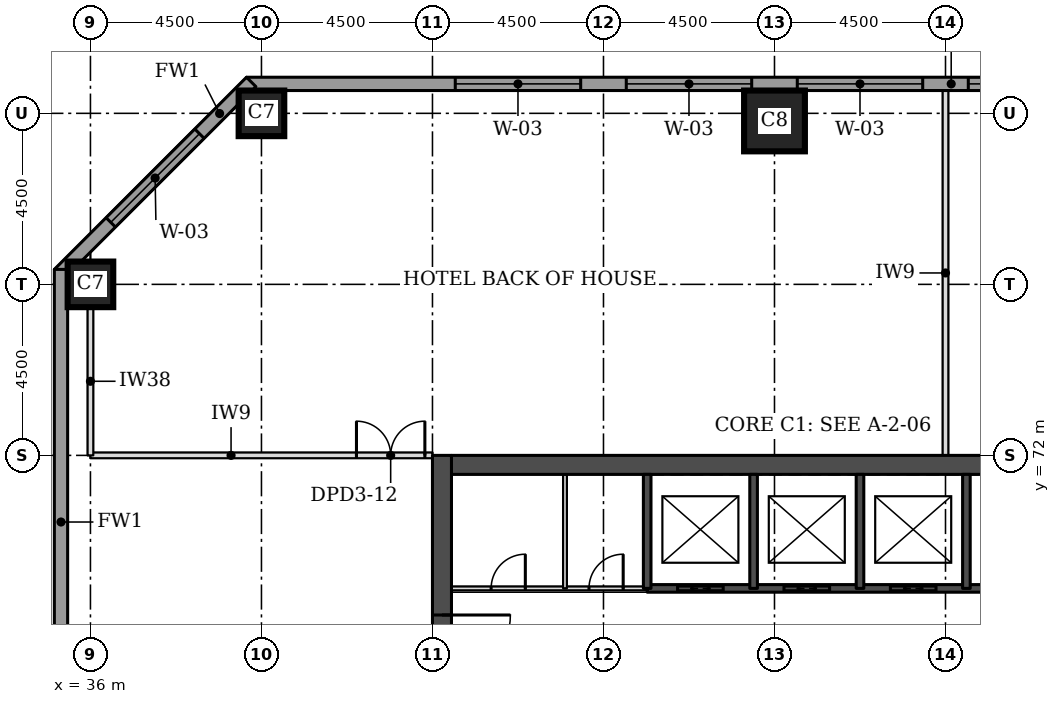
"""IFC4 building model, lengths in metres.
Left out: names, types, materials, properties, quantities, classifications, styles, units other than length and angle.
Written with IfcOpenShell. Run it as: python <this file> out.ifc"""

import sys

from ifc_helpers import new_model, si_unit, direction, frame, frame_2d, origin, origin_2d, place, context, subcontext, project, spatial, rectangle, extrude, element, fill, save


model = new_model("IFC4")
c1 = context("Model", 3, precision=1e-05, world=origin(), true_north=direction((0.0, 1.0)))
c2 = subcontext(c1, "Body", "Model", "MODEL_VIEW")
j1 = project(units=[si_unit("LENGTHUNIT", "METRE"), si_unit("PLANEANGLEUNIT", "RADIAN")], contexts=[c1])
p1 = place(None, origin())
s1 = spatial("IfcSite", under=j1, at=p1, CompositionType="ELEMENT")
p2 = place(p1, origin())
s2 = spatial("IfcBuilding", under=s1, at=p2, CompositionType="ELEMENT")
p3 = place(p2, frame((0.0, 0.0, 18.5)))
s3 = spatial("IfcBuildingStorey", under=s2, at=p3, CompositionType="ELEMENT", Elevation=18.5)
for number, where, z_axis, x_axis in (
    (1, (36.0, 76.5, 0.0), (0.0, 0.0, 1.0), (1.0, 0.0, 0.0)),
    (2, (40.5, 81.0, 0.0), (0.0, 0.0, 1.0), (1.0, 0.0, 0.0)),
):
    element("IfcColumn", number, at=place(p3, frame(where, z_axis=z_axis, x_axis=x_axis)), inside=s3, PredefinedType="COLUMN", context=c2, shape_type="SweptSolid", body=[
        extrude(rectangle(XDim=1.2, YDim=1.2, at=origin_2d()), origin(), (0.0, 0.0, 1.0), 4.6),
    ])
p4 = place(p3, frame((54.0, 80.8, 0.0), z_axis=(0.0, 0.0, 1.0), x_axis=(1.0, 0.0, 0.0)))
e3 = element("IfcColumn", 3, at=p4, inside=s3, PredefinedType="COLUMN", context=c2, shape_type="SweptSolid", body=[
    extrude(rectangle(XDim=1.6, YDim=1.6, at=origin_2d()), origin(), (0.0, 0.0, 1.0), 4.6),
])
p5 = place(p3, frame((45.5, 71.75, 0.0), z_axis=(0.0, 0.0, 1.0), x_axis=(1.0, 0.0, 0.0)))
e4 = element("IfcWall", 4, at=p5, inside=s3, PredefinedType="SHEAR", context=c2, shape_type="SweptSolid", body=[
    extrude(rectangle(XDim=21.5, YDim=0.5, at=frame_2d((10.75, 0.0))), origin(), (0.0, 0.0, 1.0), 4.6),
])
p6 = place(p3, frame((45.25, 49.5, 0.0), z_axis=(0.0, 0.0, 1.0), x_axis=(0.0, 1.0, 0.0)))
e5 = element("IfcWall", 5, at=p6, inside=s3, PredefinedType="SHEAR", context=c2, shape_type="SweptSolid", body=[
    extrude(rectangle(XDim=22.5, YDim=0.5, at=frame_2d((11.25, 0.0))), origin(), (0.0, 0.0, 1.0), 4.6),
])
p7 = place(p6, frame((4.2, 0.0, 0.0)))
e6 = element("IfcOpeningElement", 6, at=p7, cuts=e5, PredefinedType="OPENING", context=c2, shape_type="SweptSolid", body=[
    extrude(rectangle(XDim=1.8, YDim=2.1, at=frame_2d((0.9, 1.05))), frame((0.0, 0.26, 0.0), z_axis=(0.0, -1.0, 0.0), x_axis=(1.0, 0.0, 0.0)), (0.0, 0.0, 1.0), 0.52),
])
p8 = place(p6, frame((6.9, 0.0, 0.0)))
e7 = element("IfcOpeningElement", 7, at=p8, cuts=e5, PredefinedType="OPENING", context=c2, shape_type="SweptSolid", body=[
    extrude(rectangle(XDim=1.1, YDim=2.1, at=frame_2d((0.55, 1.05))), frame((0.0, 0.26, 0.0), z_axis=(0.0, -1.0, 0.0), x_axis=(1.0, 0.0, 0.0)), (0.0, 0.0, 1.0), 0.52),
])
p9 = place(p6, frame((13.6, 0.0, 0.0)))
e8 = element("IfcOpeningElement", 8, at=p9, cuts=e5, PredefinedType="OPENING", context=c2, shape_type="SweptSolid", body=[
    extrude(rectangle(XDim=1.1, YDim=2.1, at=frame_2d((0.55, 1.05))), frame((0.0, 0.26, 0.0), z_axis=(0.0, -1.0, 0.0), x_axis=(1.0, 0.0, 0.0)), (0.0, 0.0, 1.0), 0.52),
])
p10 = place(p6, frame((16.5, 0.0, 0.0)))
e9 = element("IfcOpeningElement", 9, at=p10, cuts=e5, PredefinedType="OPENING", context=c2, shape_type="SweptSolid", body=[
    extrude(rectangle(XDim=1.8, YDim=2.1, at=frame_2d((0.9, 1.05))), frame((0.0, 0.26, 0.0), z_axis=(0.0, -1.0, 0.0), x_axis=(1.0, 0.0, 0.0)), (0.0, 0.0, 1.0), 0.52),
])
p11 = place(p3, frame((72.394, 81.775, 0.0), z_axis=(0.0, 0.0, 1.0), x_axis=(-1.0, 0.0, 0.0)))
e10 = element("IfcWall", 10, at=p11, inside=s3, PredefinedType="STANDARD", context=c2, shape_type="SweptSolid", body=[
    extrude(rectangle(XDim=32.287, YDim=0.35, at=frame_2d((16.144, 0.0))), origin(), (0.0, 0.0, 1.0), 4.355),
])
p12 = place(p11, frame((5.493, 0.0, 0.9)))
e11 = element("IfcOpeningElement", 11, at=p12, cuts=e10, PredefinedType="OPENING", context=c2, shape_type="SweptSolid", body=[
    extrude(rectangle(XDim=3.3, YDim=2.7, at=frame_2d((1.65, 1.35))), frame((0.0, 0.185, 0.0), z_axis=(0.0, -1.0, 0.0), x_axis=(1.0, 0.0, 0.0)), (0.0, 0.0, 1.0), 0.37),
])
p13 = place(p11, frame((9.993, 0.0, 0.9)))
e12 = element("IfcOpeningElement", 12, at=p13, cuts=e10, PredefinedType="OPENING", context=c2, shape_type="SweptSolid", body=[
    extrude(rectangle(XDim=3.3, YDim=2.7, at=frame_2d((1.65, 1.35))), frame((0.0, 0.185, 0.0), z_axis=(0.0, -1.0, 0.0), x_axis=(1.0, 0.0, 0.0)), (0.0, 0.0, 1.0), 0.37),
])
p14 = place(p11, frame((14.493, 0.0, 0.9)))
e13 = element("IfcOpeningElement", 13, at=p14, cuts=e10, PredefinedType="OPENING", context=c2, shape_type="SweptSolid", body=[
    extrude(rectangle(XDim=3.3, YDim=2.7, at=frame_2d((1.65, 1.35))), frame((0.0, 0.185, 0.0), z_axis=(0.0, -1.0, 0.0), x_axis=(1.0, 0.0, 0.0)), (0.0, 0.0, 1.0), 0.37),
])
p15 = place(p11, frame((18.993, 0.0, 0.9)))
e14 = element("IfcOpeningElement", 14, at=p15, cuts=e10, PredefinedType="OPENING", context=c2, shape_type="SweptSolid", body=[
    extrude(rectangle(XDim=3.3, YDim=2.7, at=frame_2d((1.65, 1.35))), frame((0.0, 0.185, 0.0), z_axis=(0.0, -1.0, 0.0), x_axis=(1.0, 0.0, 0.0)), (0.0, 0.0, 1.0), 0.37),
])
p16 = place(p11, frame((23.493, 0.0, 0.9)))
e15 = element("IfcOpeningElement", 15, at=p16, cuts=e10, PredefinedType="OPENING", context=c2, shape_type="SweptSolid", body=[
    extrude(rectangle(XDim=3.3, YDim=2.7, at=frame_2d((1.65, 1.35))), frame((0.0, 0.185, 0.0), z_axis=(0.0, -1.0, 0.0), x_axis=(1.0, 0.0, 0.0)), (0.0, 0.0, 1.0), 0.37),
])
p17 = place(p3, frame((40.23, 81.826, 0.0), z_axis=(0.0, 0.0, 1.0), x_axis=(-0.707106781187, -0.707106781187, 0.0)))
e16 = element("IfcWall", 16, at=p17, inside=s3, PredefinedType="STANDARD", context=c2, shape_type="SweptSolid", body=[
    extrude(rectangle(XDim=7.151, YDim=0.35, at=frame_2d((3.576, 0.0))), origin(), (0.0, 0.0, 1.0), 4.355),
])
p18 = place(p17, frame((1.926, 0.0, 0.9)))
e17 = element("IfcOpeningElement", 17, at=p18, cuts=e16, PredefinedType="OPENING", context=c2, shape_type="SweptSolid", body=[
    extrude(rectangle(XDim=3.3, YDim=2.7, at=frame_2d((1.65, 1.35))), frame((0.0, 0.185, 0.0), z_axis=(0.0, -1.0, 0.0), x_axis=(1.0, 0.0, 0.0)), (0.0, 0.0, 1.0), 0.37),
])
p19 = place(p3, frame((35.225, 76.894, 0.0), z_axis=(0.0, 0.0, 1.0), x_axis=(0.0, -1.0, 0.0)))
e18 = element("IfcWall", 18, at=p19, inside=s3, PredefinedType="STANDARD", context=c2, shape_type="SweptSolid", body=[
    extrude(rectangle(XDim=13.293, YDim=0.35, at=frame_2d((6.647, 0.0))), origin(), (0.0, 0.0, 1.0), 4.355),
])
p20 = place(p19, frame((9.493, 0.0, 0.9)))
e19 = element("IfcOpeningElement", 19, at=p20, cuts=e18, PredefinedType="OPENING", context=c2, shape_type="SweptSolid", body=[
    extrude(rectangle(XDim=3.3, YDim=2.7, at=frame_2d((1.65, 1.35))), frame((0.0, 0.185, 0.0), z_axis=(0.0, -1.0, 0.0), x_axis=(1.0, 0.0, 0.0)), (0.0, 0.0, 1.0), 0.37),
])
p21 = place(p3, frame((36.0, 72.0, 0.0), z_axis=(0.0, 0.0, 1.0), x_axis=(1.0, 0.0, 0.0)))
e20 = element("IfcWall", 20, at=p21, inside=s3, PredefinedType="PARTITIONING", context=c2, shape_type="SweptSolid", body=[
    extrude(rectangle(XDim=9.0, YDim=0.15, at=frame_2d((4.5, 0.0))), origin(), (0.0, 0.0, 1.0), 4.38),
])
p22 = place(p21, frame((7.0, 0.0, 0.0)))
e21 = element("IfcOpeningElement", 21, at=p22, cuts=e20, PredefinedType="OPENING", context=c2, shape_type="SweptSolid", body=[
    extrude(rectangle(XDim=1.8, YDim=2.1, at=frame_2d((0.9, 1.05))), frame((0.0, 0.085, 0.0), z_axis=(0.0, -1.0, 0.0), x_axis=(1.0, 0.0, 0.0)), (0.0, 0.0, 1.0), 0.17),
])
p23 = place(p3, frame((36.0, 72.0, 0.0), z_axis=(0.0, 0.0, 1.0), x_axis=(0.0, 1.0, 0.0)))
e22 = element("IfcWall", 22, at=p23, inside=s3, PredefinedType="PARTITIONING", context=c2, shape_type="SweptSolid", body=[
    extrude(rectangle(XDim=3.9, YDim=0.15, at=frame_2d((1.95, 0.0))), origin(), (0.0, 0.0, 1.0), 3.58),
])
p24 = place(p3, frame((58.5, 72.0, 0.0), z_axis=(0.0, 0.0, 1.0), x_axis=(0.0, 1.0, 0.0)))
e23 = element("IfcWall", 23, at=p24, inside=s3, PredefinedType="PARTITIONING", context=c2, shape_type="SweptSolid", body=[
    extrude(rectangle(XDim=9.6, YDim=0.15, at=frame_2d((4.8, 0.0))), origin(), (0.0, 0.0, 1.0), 4.38),
])
p25 = place(p3, frame((45.5, 68.5, 0.0), z_axis=(0.0, 0.0, 1.0), x_axis=(1.0, 0.0, 0.0)))
e24 = element("IfcWall", 24, at=p25, inside=s3, PredefinedType="PARTITIONING", context=c2, shape_type="SweptSolid", body=[
    extrude(rectangle(XDim=5.15, YDim=0.1, at=frame_2d((2.575, 0.0))), origin(), (0.0, 0.0, 1.0), 4.38),
])
p26 = place(p25, frame((1.043, 0.0, 0.0)))
e25 = element("IfcOpeningElement", 25, at=p26, cuts=e24, PredefinedType="OPENING", context=c2, shape_type="SweptSolid", body=[
    extrude(rectangle(XDim=0.9, YDim=2.1, at=frame_2d((0.45, 1.05))), frame((0.0, 0.06, 0.0), z_axis=(0.0, -1.0, 0.0), x_axis=(1.0, 0.0, 0.0)), (0.0, 0.0, 1.0), 0.12),
])
p27 = place(p25, frame((3.618, 0.0, 0.0)))
e26 = element("IfcOpeningElement", 26, at=p27, cuts=e24, PredefinedType="OPENING", context=c2, shape_type="SweptSolid", body=[
    extrude(rectangle(XDim=0.9, YDim=2.1, at=frame_2d((0.45, 1.05))), frame((0.0, 0.06, 0.0), z_axis=(0.0, -1.0, 0.0), x_axis=(1.0, 0.0, 0.0)), (0.0, 0.0, 1.0), 0.12),
])
p28 = place(p3, frame((50.65, 68.5, 0.0), z_axis=(0.0, 0.0, 1.0), x_axis=(1.0, 0.0, 0.0)))
e27 = element("IfcWall", 27, at=p28, inside=s3, PredefinedType="SOLIDWALL", context=c2, shape_type="SweptSolid", body=[
    extrude(rectangle(XDim=11.2, YDim=0.2, at=frame_2d((5.6, 0.0))), origin(), (0.0, 0.0, 1.0), 4.38),
])
p29 = place(p28, frame((0.8, 0.0, 0.0)))
e28 = element("IfcOpeningElement", 28, at=p29, cuts=e27, PredefinedType="OPENING", context=c2, shape_type="SweptSolid", body=[
    extrude(rectangle(XDim=1.2, YDim=2.1, at=frame_2d((0.6, 1.05))), frame((0.0, 0.11, 0.0), z_axis=(0.0, -1.0, 0.0), x_axis=(1.0, 0.0, 0.0)), (0.0, 0.0, 1.0), 0.22),
])
p30 = place(p28, frame((3.6, 0.0, 0.0)))
e29 = element("IfcOpeningElement", 29, at=p30, cuts=e27, PredefinedType="OPENING", context=c2, shape_type="SweptSolid", body=[
    extrude(rectangle(XDim=1.2, YDim=2.1, at=frame_2d((0.6, 1.05))), frame((0.0, 0.11, 0.0), z_axis=(0.0, -1.0, 0.0), x_axis=(1.0, 0.0, 0.0)), (0.0, 0.0, 1.0), 0.22),
])
p31 = place(p28, frame((6.4, 0.0, 0.0)))
e30 = element("IfcOpeningElement", 30, at=p31, cuts=e27, PredefinedType="OPENING", context=c2, shape_type="SweptSolid", body=[
    extrude(rectangle(XDim=1.2, YDim=2.1, at=frame_2d((0.6, 1.05))), frame((0.0, 0.11, 0.0), z_axis=(0.0, -1.0, 0.0), x_axis=(1.0, 0.0, 0.0)), (0.0, 0.0, 1.0), 0.22),
])
p32 = place(p28, frame((9.2, 0.0, 0.0)))
e31 = element("IfcOpeningElement", 31, at=p32, cuts=e27, PredefinedType="OPENING", context=c2, shape_type="SweptSolid", body=[
    extrude(rectangle(XDim=1.2, YDim=2.1, at=frame_2d((0.6, 1.05))), frame((0.0, 0.11, 0.0), z_axis=(0.0, -1.0, 0.0), x_axis=(1.0, 0.0, 0.0)), (0.0, 0.0, 1.0), 0.22),
])
p33 = place(p3, frame((48.487, 68.5, 0.0), z_axis=(0.0, 0.0, 1.0), x_axis=(0.0, 1.0, 0.0)))
e32 = element("IfcWall", 32, at=p33, inside=s3, PredefinedType="PARTITIONING", context=c2, shape_type="SweptSolid", body=[
    extrude(rectangle(XDim=3.0, YDim=0.1, at=frame_2d((1.5, 0.0))), origin(), (0.0, 0.0, 1.0), 4.38),
])
for number, where, z_axis, x_axis in (
    (33, (50.65, 68.5, 0.0), (0.0, 0.0, 1.0), (0.0, 1.0, 0.0)),
    (34, (53.45, 68.5, 0.0), (0.0, 0.0, 1.0), (0.0, 1.0, 0.0)),
    (35, (56.25, 68.5, 0.0), (0.0, 0.0, 1.0), (0.0, 1.0, 0.0)),
    (36, (59.05, 68.5, 0.0), (0.0, 0.0, 1.0), (0.0, 1.0, 0.0)),
):
    element("IfcWall", number, at=place(p3, frame(where, z_axis=z_axis, x_axis=x_axis)), inside=s3, PredefinedType="SOLIDWALL", context=c2, shape_type="SweptSolid", body=[
        extrude(rectangle(XDim=3.0, YDim=0.2, at=frame_2d((1.5, 0.0))), origin(), (0.0, 0.0, 1.0), 4.38),
    ])
p34 = place(p13, origin())
e37 = element("IfcWindow", 37, at=p34, inside=s3, PartitioningType="SINGLE_PANEL", PredefinedType="WINDOW", context=c2, shape_type="SweptSolid", body=[
    extrude(rectangle(XDim=3.3, YDim=2.7, at=frame_2d((1.65, 1.35))), frame((0.0, 0.085, 0.0), z_axis=(0.0, -1.0, 0.0), x_axis=(1.0, 0.0, 0.0)), (0.0, 0.0, 1.0), 0.06),
])
fill(e12, e37)
p35 = place(p14, origin())
e38 = element("IfcWindow", 38, at=p35, inside=s3, PartitioningType="SINGLE_PANEL", PredefinedType="WINDOW", context=c2, shape_type="SweptSolid", body=[
    extrude(rectangle(XDim=3.3, YDim=2.7, at=frame_2d((1.65, 1.35))), frame((0.0, 0.085, 0.0), z_axis=(0.0, -1.0, 0.0), x_axis=(1.0, 0.0, 0.0)), (0.0, 0.0, 1.0), 0.06),
])
fill(e13, e38)
p36 = place(p15, origin())
e39 = element("IfcWindow", 39, at=p36, inside=s3, PartitioningType="SINGLE_PANEL", PredefinedType="WINDOW", context=c2, shape_type="SweptSolid", body=[
    extrude(rectangle(XDim=3.3, YDim=2.7, at=frame_2d((1.65, 1.35))), frame((0.0, 0.085, 0.0), z_axis=(0.0, -1.0, 0.0), x_axis=(1.0, 0.0, 0.0)), (0.0, 0.0, 1.0), 0.06),
])
fill(e14, e39)
p37 = place(p16, origin())
e40 = element("IfcWindow", 40, at=p37, inside=s3, PartitioningType="SINGLE_PANEL", PredefinedType="WINDOW", context=c2, shape_type="SweptSolid", body=[
    extrude(rectangle(XDim=3.3, YDim=2.7, at=frame_2d((1.65, 1.35))), frame((0.0, 0.085, 0.0), z_axis=(0.0, -1.0, 0.0), x_axis=(1.0, 0.0, 0.0)), (0.0, 0.0, 1.0), 0.06),
])
fill(e15, e40)
p38 = place(p18, origin())
e41 = element("IfcWindow", 41, at=p38, inside=s3, PartitioningType="SINGLE_PANEL", PredefinedType="WINDOW", context=c2, shape_type="SweptSolid", body=[
    extrude(rectangle(XDim=3.3, YDim=2.7, at=frame_2d((1.65, 1.35))), frame((0.0, 0.085, 0.0), z_axis=(0.0, -1.0, 0.0), x_axis=(1.0, 0.0, 0.0)), (0.0, 0.0, 1.0), 0.06),
])
fill(e17, e41)
p39 = place(p22, origin())
e42 = element("IfcDoor", 42, at=p39, inside=s3, OperationType="DOUBLE_DOOR_SINGLE_SWING", PredefinedType="DOOR", context=c2, shape_type="SweptSolid", body=[
    extrude(rectangle(XDim=1.8, YDim=2.1, at=frame_2d((0.9, 1.05))), frame((0.0, 0.025, 0.0), z_axis=(0.0, -1.0, 0.0), x_axis=(1.0, 0.0, 0.0)), (0.0, 0.0, 1.0), 0.05),
])
fill(e21, e42)
p40 = place(p29, origin())
e43 = element("IfcDoor", 43, at=p40, inside=s3, OperationType="DOUBLE_DOOR_SLIDING", PredefinedType="DOOR", context=c2, shape_type="SweptSolid", body=[
    extrude(rectangle(XDim=1.2, YDim=2.1, at=frame_2d((0.6, 1.05))), frame((0.0, 0.025, 0.0), z_axis=(0.0, -1.0, 0.0), x_axis=(1.0, 0.0, 0.0)), (0.0, 0.0, 1.0), 0.05),
])
fill(e28, e43)
p41 = place(p30, origin())
e44 = element("IfcDoor", 44, at=p41, inside=s3, OperationType="DOUBLE_DOOR_SLIDING", PredefinedType="DOOR", context=c2, shape_type="SweptSolid", body=[
    extrude(rectangle(XDim=1.2, YDim=2.1, at=frame_2d((0.6, 1.05))), frame((0.0, 0.025, 0.0), z_axis=(0.0, -1.0, 0.0), x_axis=(1.0, 0.0, 0.0)), (0.0, 0.0, 1.0), 0.05),
])
fill(e29, e44)
p42 = place(p31, origin())
e45 = element("IfcDoor", 45, at=p42, inside=s3, OperationType="DOUBLE_DOOR_SLIDING", PredefinedType="DOOR", context=c2, shape_type="SweptSolid", body=[
    extrude(rectangle(XDim=1.2, YDim=2.1, at=frame_2d((0.6, 1.05))), frame((0.0, 0.025, 0.0), z_axis=(0.0, -1.0, 0.0), x_axis=(1.0, 0.0, 0.0)), (0.0, 0.0, 1.0), 0.05),
])
fill(e30, e45)
p43 = place(p10, frame((1.8, 0.0, 0.0), z_axis=(0.0, 0.0, 1.0), x_axis=(-1.0, 0.0, 0.0)))
e46 = element("IfcDoor", 46, at=p43, inside=s3, OperationType="SINGLE_SWING_LEFT", PredefinedType="DOOR", context=c2, shape_type="SweptSolid", body=[
    extrude(rectangle(XDim=1.8, YDim=2.1, at=frame_2d((0.9, 1.05))), frame((0.0, 0.025, 0.0), z_axis=(0.0, -1.0, 0.0), x_axis=(1.0, 0.0, 0.0)), (0.0, 0.0, 1.0), 0.05),
])
fill(e9, e46)
p44 = place(p26, origin())
e47 = element("IfcDoor", 47, at=p44, inside=s3, OperationType="SINGLE_SWING_RIGHT", PredefinedType="DOOR", context=c2, shape_type="SweptSolid", body=[
    extrude(rectangle(XDim=0.9, YDim=2.1, at=frame_2d((0.45, 1.05))), frame((0.0, 0.025, 0.0), z_axis=(0.0, -1.0, 0.0), x_axis=(1.0, 0.0, 0.0)), (0.0, 0.0, 1.0), 0.05),
])
fill(e25, e47)
p45 = place(p27, origin())
e48 = element("IfcDoor", 48, at=p45, inside=s3, OperationType="SINGLE_SWING_RIGHT", PredefinedType="DOOR", context=c2, shape_type="SweptSolid", body=[
    extrude(rectangle(XDim=0.9, YDim=2.1, at=frame_2d((0.45, 1.05))), frame((0.0, 0.025, 0.0), z_axis=(0.0, -1.0, 0.0), x_axis=(1.0, 0.0, 0.0)), (0.0, 0.0, 1.0), 0.05),
])
fill(e26, e48)
save(model, sys.argv[1])
